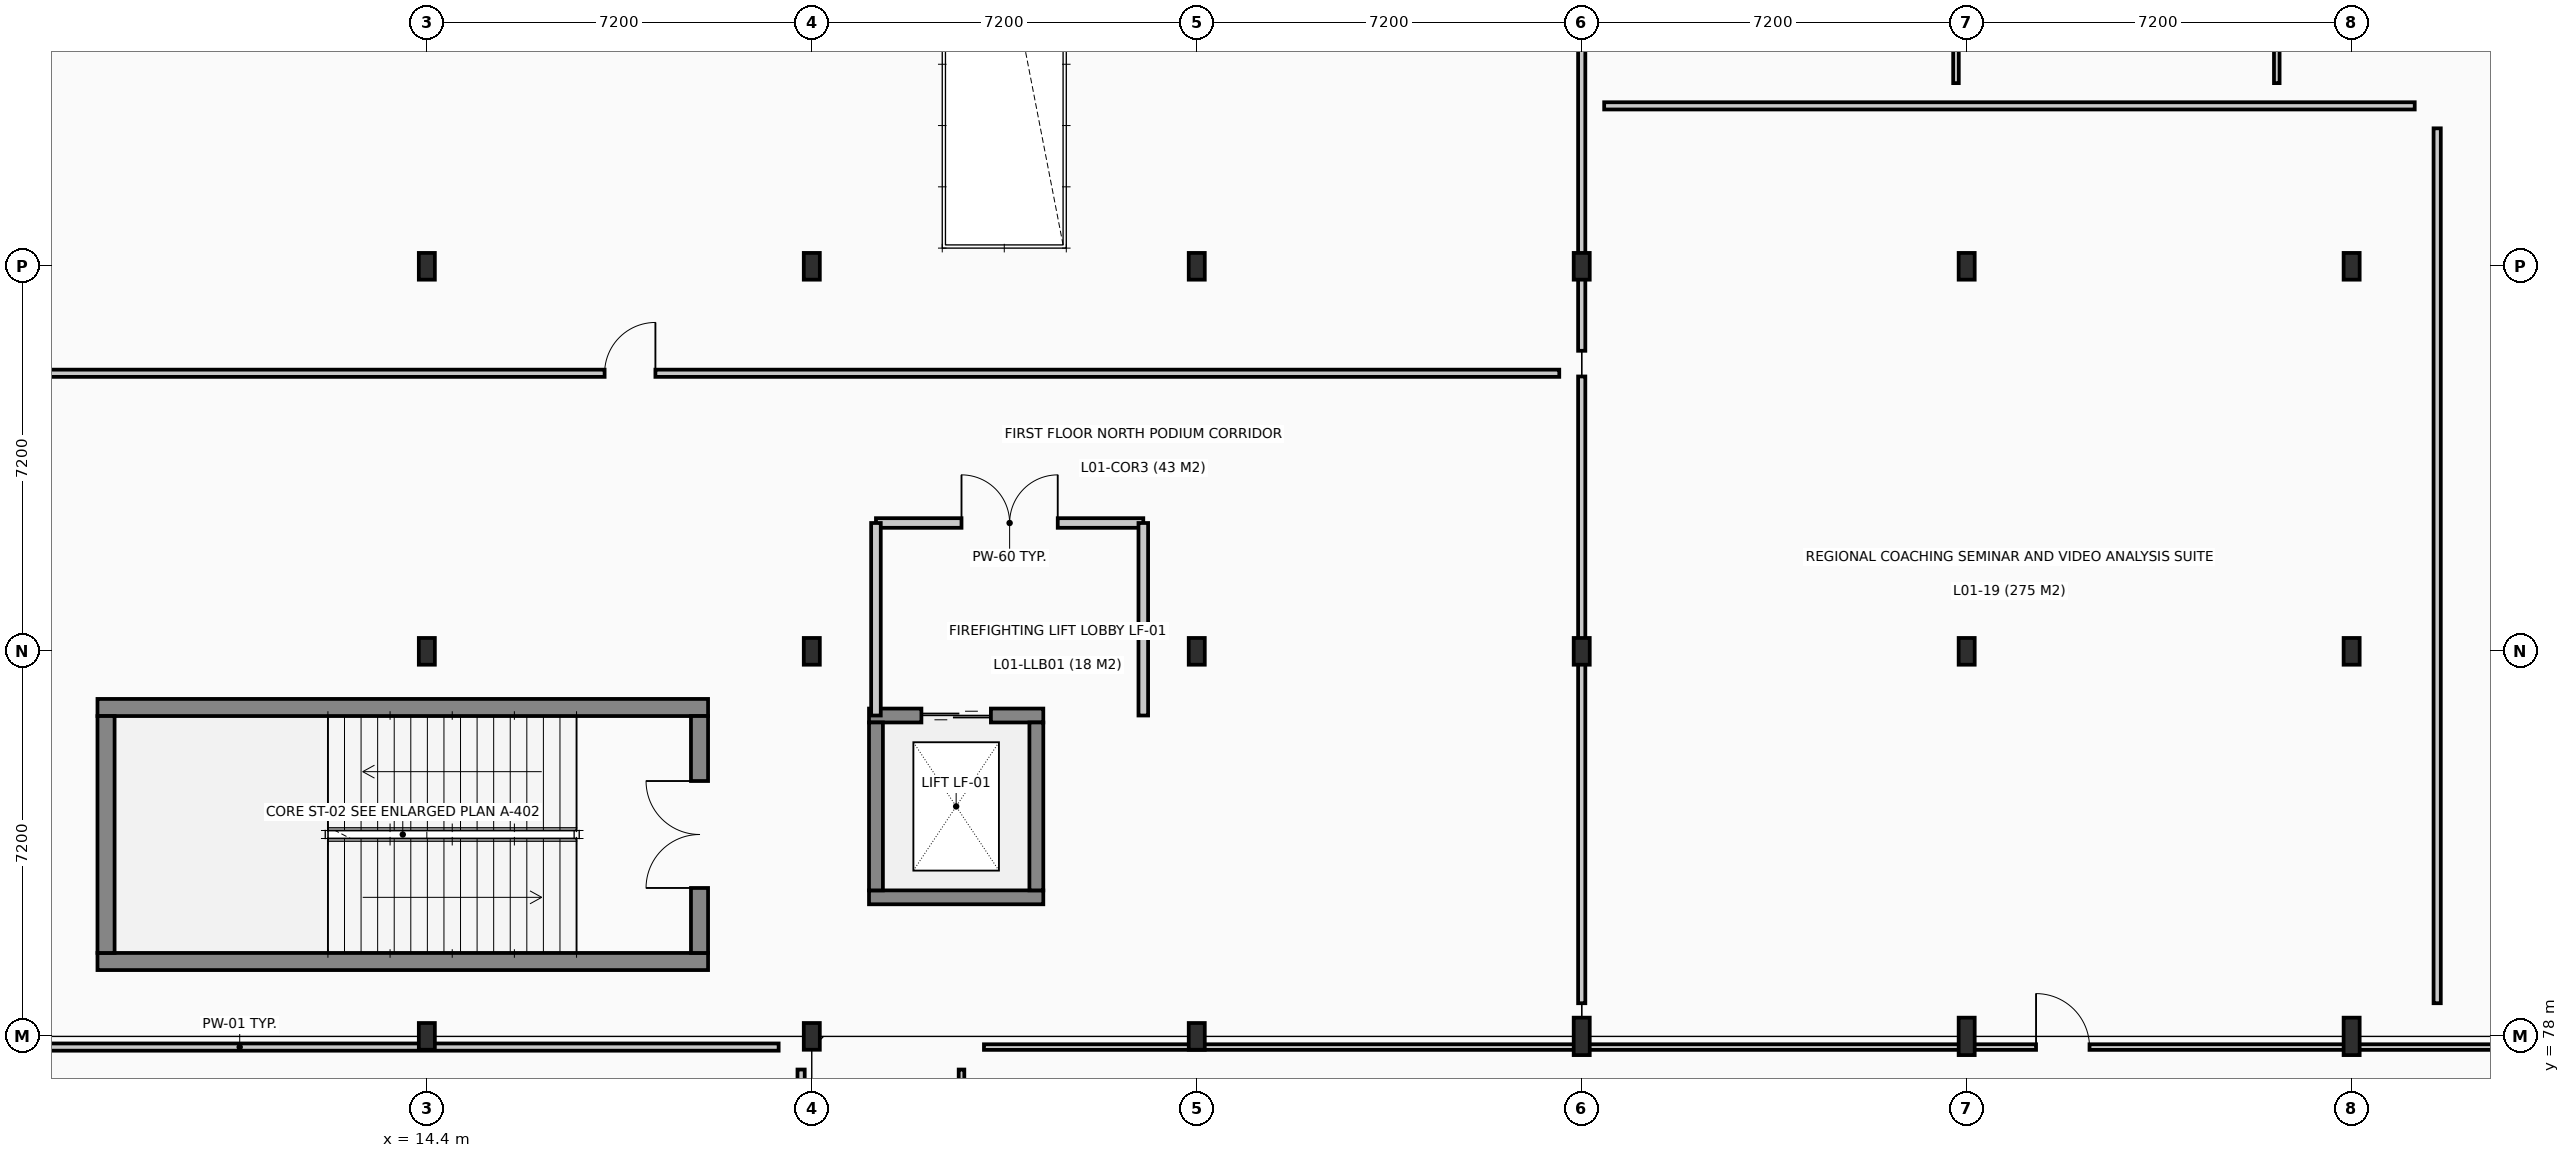
"""IFC4 building model, lengths in metres.
Left out: names, types, materials, properties, quantities, classifications, styles, units other than length and angle.
Written with IfcOpenShell. Run it as: python <this file> out.ifc"""

import sys

from ifc_helpers import new_model, si_unit, direction, frame, frame_2d, origin, origin_2d, place, context, subcontext, project, spatial, rectangle, i_section, extrude, element, fill, save


model = new_model("IFC4")
c1 = context("Model", 3, precision=1e-05, world=origin(), true_north=direction((0.0, 1.0)))
c2 = subcontext(c1, "Body", "Model", "MODEL_VIEW")
j1 = project(units=[si_unit("LENGTHUNIT", "METRE"), si_unit("PLANEANGLEUNIT", "RADIAN")], contexts=[c1])
p1 = place(None, origin())
s1 = spatial("IfcSite", under=j1, at=p1, CompositionType="ELEMENT")
p2 = place(p1, origin())
s2 = spatial("IfcBuilding", under=s1, at=p2, CompositionType="ELEMENT")
p3 = place(p2, frame((0.0, 0.0, 4.8)))
s3 = spatial("IfcBuildingStorey", under=s2, at=p3, CompositionType="ELEMENT", Elevation=4.8)
for number, where, z_axis, x_axis in (
    (1, (14.4, 78.0, 0.0), (0.0, 0.0, 1.0), (1.0, 0.0, 0.0)),
    (2, (14.4, 85.2, 0.0), (0.0, 0.0, 1.0), (1.0, 0.0, 0.0)),
    (3, (14.4, 92.4, 0.0), (0.0, 0.0, 1.0), (1.0, 0.0, 0.0)),
    (4, (21.6, 78.0, 0.0), (0.0, 0.0, 1.0), (1.0, 0.0, 0.0)),
    (5, (21.6, 85.2, 0.0), (0.0, 0.0, 1.0), (1.0, 0.0, 0.0)),
    (6, (21.6, 92.4, 0.0), (0.0, 0.0, 1.0), (1.0, 0.0, 0.0)),
    (7, (28.8, 78.0, 0.0), (0.0, 0.0, 1.0), (1.0, 0.0, 0.0)),
    (8, (28.8, 85.2, 0.0), (0.0, 0.0, 1.0), (1.0, 0.0, 0.0)),
    (9, (28.8, 92.4, 0.0), (0.0, 0.0, 1.0), (1.0, 0.0, 0.0)),
):
    element("IfcColumn", number, at=place(p3, frame(where, z_axis=z_axis, x_axis=x_axis)), inside=s3, PredefinedType="COLUMN", context=c2, shape_type="SweptSolid", body=[
        extrude(i_section(OverallWidth=0.3, OverallDepth=0.5, WebThickness=0.014, FlangeThickness=0.028, at=origin_2d()), origin(), (0.0, 0.0, 1.0), 4.8),
    ])
p4 = place(p3, frame((36.0, 78.0, 0.0), z_axis=(0.0, 0.0, 1.0), x_axis=(1.0, 0.0, 0.0)))
e10 = element("IfcColumn", 10, at=p4, inside=s3, PredefinedType="COLUMN", context=c2, shape_type="SweptSolid", body=[
    extrude(i_section(OverallWidth=0.3, OverallDepth=0.7, WebThickness=0.017, FlangeThickness=0.032, at=origin_2d()), origin(), (0.0, 0.0, 1.0), 4.8),
])
for number, where, z_axis, x_axis in (
    (11, (36.0, 85.2, 0.0), (0.0, 0.0, 1.0), (1.0, 0.0, 0.0)),
    (12, (36.0, 92.4, 0.0), (0.0, 0.0, 1.0), (1.0, 0.0, 0.0)),
):
    element("IfcColumn", number, at=place(p3, frame(where, z_axis=z_axis, x_axis=x_axis)), inside=s3, PredefinedType="COLUMN", context=c2, shape_type="SweptSolid", body=[
        extrude(i_section(OverallWidth=0.3, OverallDepth=0.5, WebThickness=0.014, FlangeThickness=0.028, at=origin_2d()), origin(), (0.0, 0.0, 1.0), 4.8),
    ])
p5 = place(p3, frame((43.2, 78.0, 0.0), z_axis=(0.0, 0.0, 1.0), x_axis=(1.0, 0.0, 0.0)))
e13 = element("IfcColumn", 13, at=p5, inside=s3, PredefinedType="COLUMN", context=c2, shape_type="SweptSolid", body=[
    extrude(i_section(OverallWidth=0.3, OverallDepth=0.7, WebThickness=0.017, FlangeThickness=0.032, at=origin_2d()), origin(), (0.0, 0.0, 1.0), 4.8),
])
for number, where, z_axis, x_axis in (
    (14, (43.2, 85.2, 0.0), (0.0, 0.0, 1.0), (1.0, 0.0, 0.0)),
    (15, (43.2, 92.4, 0.0), (0.0, 0.0, 1.0), (1.0, 0.0, 0.0)),
):
    element("IfcColumn", number, at=place(p3, frame(where, z_axis=z_axis, x_axis=x_axis)), inside=s3, PredefinedType="COLUMN", context=c2, shape_type="SweptSolid", body=[
        extrude(i_section(OverallWidth=0.3, OverallDepth=0.5, WebThickness=0.014, FlangeThickness=0.028, at=origin_2d()), origin(), (0.0, 0.0, 1.0), 4.8),
    ])
p6 = place(p3, frame((50.4, 78.0, 0.0), z_axis=(0.0, 0.0, 1.0), x_axis=(1.0, 0.0, 0.0)))
e16 = element("IfcColumn", 16, at=p6, inside=s3, PredefinedType="COLUMN", context=c2, shape_type="SweptSolid", body=[
    extrude(i_section(OverallWidth=0.3, OverallDepth=0.7, WebThickness=0.017, FlangeThickness=0.032, at=origin_2d()), origin(), (0.0, 0.0, 1.0), 4.8),
])
for number, where, z_axis, x_axis in (
    (17, (50.4, 85.2, 0.0), (0.0, 0.0, 1.0), (1.0, 0.0, 0.0)),
    (18, (50.4, 92.4, 0.0), (0.0, 0.0, 1.0), (1.0, 0.0, 0.0)),
):
    element("IfcColumn", number, at=place(p3, frame(where, z_axis=z_axis, x_axis=x_axis)), inside=s3, PredefinedType="COLUMN", context=c2, shape_type="SweptSolid", body=[
        extrude(i_section(OverallWidth=0.3, OverallDepth=0.5, WebThickness=0.014, FlangeThickness=0.028, at=origin_2d()), origin(), (0.0, 0.0, 1.0), 4.8),
    ])
for number, where, z_axis, x_axis in (
    (19, (8.24, 79.4, 0.0), (0.0, 0.0, 1.0), (1.0, 0.0, 0.0)),
    (20, (8.24, 84.15, 0.0), (0.0, 0.0, 1.0), (1.0, 0.0, 0.0)),
):
    element("IfcWall", number, at=place(p3, frame(where, z_axis=z_axis, x_axis=x_axis)), inside=s3, PredefinedType="SHEAR", context=c2, shape_type="SweptSolid", body=[
        extrude(rectangle(XDim=11.42, YDim=0.32, at=frame_2d((5.71, 0.0))), origin(), (0.0, 0.0, 1.0), 4.56),
    ])
p7 = place(p3, frame((8.4, 79.56, 0.0), z_axis=(0.0, 0.0, 1.0), x_axis=(0.0, 1.0, 0.0)))
e21 = element("IfcWall", 21, at=p7, inside=s3, PredefinedType="SHEAR", context=c2, shape_type="SweptSolid", body=[
    extrude(rectangle(XDim=4.43, YDim=0.32, at=frame_2d((2.215, 0.0))), origin(), (0.0, 0.0, 1.0), 4.56),
])
p8 = place(p3, frame((19.5, 79.56, 0.0), z_axis=(0.0, 0.0, 1.0), x_axis=(0.0, 1.0, 0.0)))
e22 = element("IfcWall", 22, at=p8, inside=s3, PredefinedType="SHEAR", context=c2, shape_type="SweptSolid", body=[
    extrude(rectangle(XDim=4.43, YDim=0.32, at=frame_2d((2.215, 0.0))), origin(), (0.0, 0.0, 1.0), 4.56),
])
p9 = place(p8, frame((1.215, 0.0, 0.0)))
e23 = element("IfcOpeningElement", 23, at=p9, cuts=e22, PredefinedType="OPENING", context=c2, shape_type="SweptSolid", body=[
    extrude(rectangle(XDim=2.0, YDim=2.15, at=frame_2d((1.0, 1.075))), frame((0.0, 0.17, 0.0), z_axis=(0.0, -1.0, 0.0), x_axis=(1.0, 0.0, 0.0)), (0.0, 0.0, 1.0), 0.34),
])
p10 = place(p3, frame((22.67, 80.6, 0.0), z_axis=(0.0, 0.0, 1.0), x_axis=(1.0, 0.0, 0.0)))
e24 = element("IfcWall", 24, at=p10, inside=s3, PredefinedType="SHEAR", context=c2, shape_type="SweptSolid", body=[
    extrude(rectangle(XDim=3.26, YDim=0.26, at=frame_2d((1.63, 0.0))), origin(), (0.0, 0.0, 1.0), 4.56),
])
p11 = place(p3, frame((22.67, 84.0, 0.0), z_axis=(0.0, 0.0, 1.0), x_axis=(1.0, 0.0, 0.0)))
e25 = element("IfcWall", 25, at=p11, inside=s3, PredefinedType="SHEAR", context=c2, shape_type="SweptSolid", body=[
    extrude(rectangle(XDim=3.26, YDim=0.26, at=frame_2d((1.63, 0.0))), origin(), (0.0, 0.0, 1.0), 4.56),
])
p12 = place(p11, frame((0.98, 0.0, 0.0)))
e26 = element("IfcOpeningElement", 26, at=p12, cuts=e25, PredefinedType="OPENING", context=c2, shape_type="SweptSolid", body=[
    extrude(rectangle(XDim=1.3, YDim=2.2, at=frame_2d((0.65, 1.1))), frame((0.0, 0.14, 0.0), z_axis=(0.0, -1.0, 0.0), x_axis=(1.0, 0.0, 0.0)), (0.0, 0.0, 1.0), 0.28),
])
for number, where, z_axis, x_axis in (
    (27, (22.8, 80.73, 0.0), (0.0, 0.0, 1.0), (0.0, 1.0, 0.0)),
    (28, (25.8, 80.73, 0.0), (0.0, 0.0, 1.0), (0.0, 1.0, 0.0)),
):
    element("IfcWall", number, at=place(p3, frame(where, z_axis=z_axis, x_axis=x_axis)), inside=s3, PredefinedType="SHEAR", context=c2, shape_type="SweptSolid", body=[
        extrude(rectangle(XDim=3.14, YDim=0.26, at=frame_2d((1.57, 0.0))), origin(), (0.0, 0.0, 1.0), 4.56),
    ])
p13 = place(p3, frame((22.8, 87.6, 0.0), z_axis=(0.0, 0.0, 1.0), x_axis=(1.0, 0.0, 0.0)))
e29 = element("IfcWall", 29, at=p13, inside=s3, PredefinedType="PARTITIONING", context=c2, shape_type="SweptSolid", body=[
    extrude(rectangle(XDim=5.0, YDim=0.18, at=frame_2d((2.5, 0.0))), origin(), (0.0, 0.0, 1.0), 4.21),
])
p14 = place(p13, frame((1.6, 0.0, 0.0)))
e30 = element("IfcOpeningElement", 30, at=p14, cuts=e29, PredefinedType="OPENING", context=c2, shape_type="SweptSolid", body=[
    extrude(rectangle(XDim=1.8, YDim=2.15, at=frame_2d((0.9, 1.075))), frame((0.0, 0.1, 0.0), z_axis=(0.0, -1.0, 0.0), x_axis=(1.0, 0.0, 0.0)), (0.0, 0.0, 1.0), 0.2),
])
for number, where, z_axis, x_axis in (
    (31, (22.8, 84.0, 0.0), (0.0, 0.0, 1.0), (0.0, 1.0, 0.0)),
    (32, (27.8, 84.0, 0.0), (0.0, 0.0, 1.0), (0.0, 1.0, 0.0)),
):
    element("IfcWall", number, at=place(p3, frame(where, z_axis=z_axis, x_axis=x_axis)), inside=s3, PredefinedType="PARTITIONING", context=c2, shape_type="SweptSolid", body=[
        extrude(rectangle(XDim=3.6, YDim=0.18, at=frame_2d((1.8, 0.0))), origin(), (0.0, 0.0, 1.0), 4.545),
    ])
p15 = place(p3, frame((24.82, 77.8, 0.0), z_axis=(0.0, 0.0, 1.0), x_axis=(1.0, 0.0, 0.0)))
e33 = element("IfcWall", 33, at=p15, inside=s3, PredefinedType="PARTITIONING", context=c2, shape_type="SweptSolid", body=[
    extrude(rectangle(XDim=36.555, YDim=0.105, at=frame_2d((18.277, 0.0))), origin(), (0.0, 0.0, 1.0), 3.99),
])
p16 = place(p15, frame((19.677, 0.0, 0.0)))
e34 = element("IfcOpeningElement", 34, at=p16, cuts=e33, PredefinedType="OPENING", context=c2, shape_type="SweptSolid", body=[
    extrude(rectangle(XDim=1.0, YDim=2.1, at=frame_2d((0.5, 1.05))), frame((0.0, 0.062, 0.0), z_axis=(0.0, -1.0, 0.0), x_axis=(1.0, 0.0, 0.0)), (0.0, 0.0, 1.0), 0.125),
])
p17 = place(p3, frame((24.4, 49.82, 0.0), z_axis=(0.0, 0.0, 1.0), x_axis=(0.0, 1.0, 0.0)))
e35 = element("IfcWall", 35, at=p17, inside=s3, PredefinedType="PARTITIONING", context=c2, shape_type="SweptSolid", body=[
    extrude(rectangle(XDim=27.56, YDim=0.105, at=frame_2d((13.78, 0.0))), origin(), (0.0, 0.0, 1.0), 4.545),
])
p18 = place(p3, frame((0.82, 77.8, 0.0), z_axis=(0.0, 0.0, 1.0), x_axis=(1.0, 0.0, 0.0)))
e36 = element("IfcWall", 36, at=p18, inside=s3, PredefinedType="PARTITIONING", context=c2, shape_type="SweptSolid", body=[
    extrude(rectangle(XDim=20.16, YDim=0.135, at=frame_2d((10.08, 0.0))), origin(), (0.0, 0.0, 1.0), 3.99),
])
p19 = place(p3, frame((21.4, 49.625, 0.0), z_axis=(0.0, 0.0, 1.0), x_axis=(0.0, 1.0, 0.0)))
e37 = element("IfcWall", 37, at=p19, inside=s3, PredefinedType="PARTITIONING", context=c2, shape_type="SweptSolid", body=[
    extrude(rectangle(XDim=27.755, YDim=0.135, at=frame_2d((13.877, 0.0))), origin(), (0.0, 0.0, 1.0), 3.99),
])
p20 = place(p3, frame((0.82, 90.4, 0.0), z_axis=(0.0, 0.0, 1.0), x_axis=(1.0, 0.0, 0.0)))
e38 = element("IfcWall", 38, at=p20, inside=s3, PredefinedType="PARTITIONING", context=c2, shape_type="SweptSolid", body=[
    extrude(rectangle(XDim=34.76, YDim=0.135, at=frame_2d((17.38, 0.0))), origin(), (0.0, 0.0, 1.0), 4.545),
])
p21 = place(p20, frame((16.905, 0.0, 0.0)))
e39 = element("IfcOpeningElement", 39, at=p21, cuts=e38, PredefinedType="OPENING", context=c2, shape_type="SweptSolid", body=[
    extrude(rectangle(XDim=0.95, YDim=2.1, at=frame_2d((0.475, 1.05))), frame((0.0, 0.077, 0.0), z_axis=(0.0, -1.0, 0.0), x_axis=(1.0, 0.0, 0.0)), (0.0, 0.0, 1.0), 0.155),
])
p22 = place(p3, frame((36.0, 90.82, 0.0), z_axis=(0.0, 0.0, 1.0), x_axis=(0.0, 1.0, 0.0)))
e40 = element("IfcWall", 40, at=p22, inside=s3, PredefinedType="PARTITIONING", context=c2, shape_type="SweptSolid", body=[
    extrude(rectangle(XDim=18.76, YDim=0.135, at=frame_2d((9.38, 0.0))), origin(), (0.0, 0.0, 1.0), 3.89),
])
p23 = place(p3, frame((36.42, 95.4, 0.0), z_axis=(0.0, 0.0, 1.0), x_axis=(1.0, 0.0, 0.0)))
e41 = element("IfcWall", 41, at=p23, inside=s3, PredefinedType="PARTITIONING", context=c2, shape_type="SweptSolid", body=[
    extrude(rectangle(XDim=15.16, YDim=0.135, at=frame_2d((7.58, 0.0))), origin(), (0.0, 0.0, 1.0), 4.545),
])
p24 = place(p3, frame((36.0, 78.62, 0.0), z_axis=(0.0, 0.0, 1.0), x_axis=(0.0, 1.0, 0.0)))
e42 = element("IfcWall", 42, at=p24, inside=s3, PredefinedType="PARTITIONING", context=c2, shape_type="SweptSolid", body=[
    extrude(rectangle(XDim=11.72, YDim=0.135, at=frame_2d((5.86, 0.0))), origin(), (0.0, 0.0, 1.0), 3.99),
])
p25 = place(p3, frame((52.0, 78.62, 0.0), z_axis=(0.0, 0.0, 1.0), x_axis=(0.0, 1.0, 0.0)))
e43 = element("IfcWall", 43, at=p25, inside=s3, PredefinedType="PARTITIONING", context=c2, shape_type="SweptSolid", body=[
    extrude(rectangle(XDim=16.36, YDim=0.135, at=frame_2d((8.18, 0.0))), origin(), (0.0, 0.0, 1.0), 4.545),
])
p26 = place(p3, frame((43.0, 95.825, 0.0), z_axis=(0.0, 0.0, 1.0), x_axis=(0.0, 1.0, 0.0)))
e44 = element("IfcWall", 44, at=p26, inside=s3, PredefinedType="PARTITIONING", context=c2, shape_type="SweptSolid", body=[
    extrude(rectangle(XDim=5.755, YDim=0.105, at=frame_2d((2.877, 0.0))), origin(), (0.0, 0.0, 1.0), 3.89),
])
p27 = place(p3, frame((49.0, 95.825, 0.0), z_axis=(0.0, 0.0, 1.0), x_axis=(0.0, 1.0, 0.0)))
e45 = element("IfcWall", 45, at=p27, inside=s3, PredefinedType="PARTITIONING", context=c2, shape_type="SweptSolid", body=[
    extrude(rectangle(XDim=5.755, YDim=0.105, at=frame_2d((2.877, 0.0))), origin(), (0.0, 0.0, 1.0), 4.545),
])
p28 = place(p9, origin())
e46 = element("IfcDoor", 46, at=p28, inside=s3, OperationType="DOUBLE_DOOR_SINGLE_SWING", PredefinedType="DOOR", context=c2, shape_type="SweptSolid", body=[
    extrude(rectangle(XDim=2.0, YDim=2.15, at=frame_2d((1.0, 1.075))), frame((0.0, 0.025, 0.0), z_axis=(0.0, -1.0, 0.0), x_axis=(1.0, 0.0, 0.0)), (0.0, 0.0, 1.0), 0.05),
])
fill(e23, e46)
p29 = place(p12, origin())
e47 = element("IfcDoor", 47, at=p29, inside=s3, OperationType="DOUBLE_DOOR_SLIDING", PredefinedType="DOOR", context=c2, shape_type="SweptSolid", body=[
    extrude(rectangle(XDim=1.3, YDim=2.2, at=frame_2d((0.65, 1.1))), frame((0.0, 0.025, 0.0), z_axis=(0.0, -1.0, 0.0), x_axis=(1.0, 0.0, 0.0)), (0.0, 0.0, 1.0), 0.05),
])
fill(e26, e47)
p30 = place(p14, origin())
e48 = element("IfcDoor", 48, at=p30, inside=s3, OperationType="DOUBLE_DOOR_SINGLE_SWING", PredefinedType="DOOR", context=c2, shape_type="SweptSolid", body=[
    extrude(rectangle(XDim=1.8, YDim=2.15, at=frame_2d((0.9, 1.075))), frame((0.0, 0.025, 0.0), z_axis=(0.0, -1.0, 0.0), x_axis=(1.0, 0.0, 0.0)), (0.0, 0.0, 1.0), 0.05),
])
fill(e30, e48)
p31 = place(p21, origin())
e49 = element("IfcDoor", 49, at=p31, inside=s3, OperationType="SINGLE_SWING_RIGHT", PredefinedType="DOOR", context=c2, shape_type="SweptSolid", body=[
    extrude(rectangle(XDim=0.95, YDim=2.1, at=frame_2d((0.475, 1.05))), frame((0.0, 0.025, 0.0), z_axis=(0.0, -1.0, 0.0), x_axis=(1.0, 0.0, 0.0)), (0.0, 0.0, 1.0), 0.05),
])
fill(e39, e49)
p32 = place(p16, origin())
e50 = element("IfcDoor", 50, at=p32, inside=s3, OperationType="SINGLE_SWING_LEFT", PredefinedType="DOOR", context=c2, shape_type="SweptSolid", body=[
    extrude(rectangle(XDim=1.0, YDim=2.1, at=frame_2d((0.5, 1.05))), frame((0.0, 0.025, 0.0), z_axis=(0.0, -1.0, 0.0), x_axis=(1.0, 0.0, 0.0)), (0.0, 0.0, 1.0), 0.05),
])
fill(e34, e50)
save(model, sys.argv[1])
